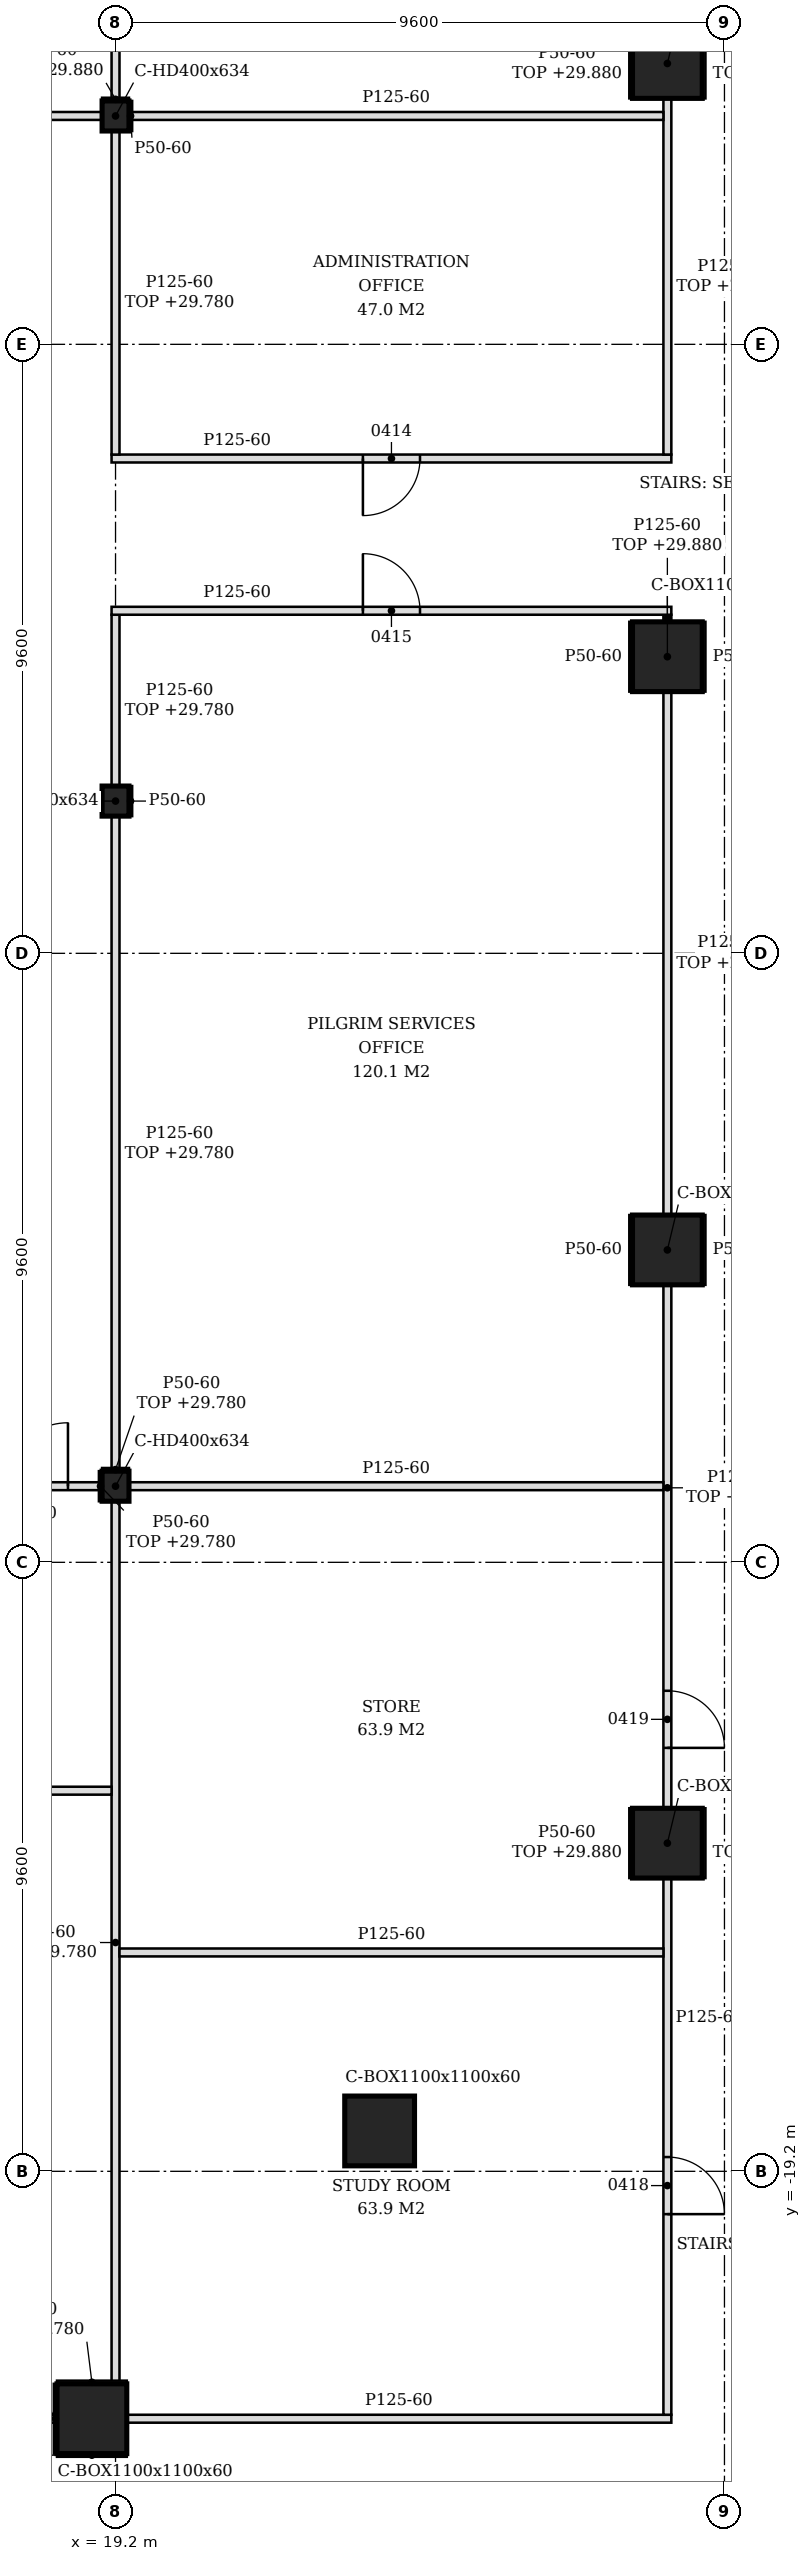
"""IFC4 building model, lengths in metres.
Left out: names, types, materials, properties, quantities, classifications, styles, units other than length and angle.
Written with IfcOpenShell. Run it as: python <this file> out.ifc"""

import sys

from ifc_helpers import new_model, si_unit, direction, frame, frame_2d, origin, origin_2d, place, context, subcontext, project, spatial, polyline, rectangle, hollow_rectangle, i_section, outline, extrude, element, fill, save


model = new_model("IFC4")
c1 = context("Model", 3, precision=1e-05, world=origin(), true_north=direction((0.0, 1.0)))
c2 = subcontext(c1, "Body", "Model", "MODEL_VIEW")
j1 = project(units=[si_unit("LENGTHUNIT", "METRE"), si_unit("PLANEANGLEUNIT", "RADIAN")], contexts=[c1])
p1 = place(None, origin())
s1 = spatial("IfcSite", under=j1, at=p1, CompositionType="ELEMENT")
p2 = place(p1, origin())
s2 = spatial("IfcBuilding", under=s1, at=p2, CompositionType="ELEMENT")
p3 = place(p2, frame((0.0, 0.0, 25.8)))
s3 = spatial("IfcBuildingStorey", under=s2, at=p3, CompositionType="ELEMENT", Elevation=25.8)
for number, where, z_axis, x_axis in (
    (1, (18.827, -23.1, -0.2), (0.0, 0.0, 1.0), (1.0, 0.0, 0.0)),
    (2, (23.364, -18.564, -0.2), (0.0, 0.0, 1.0), (1.0, 0.0, 0.0)),
    (3, (27.9, -14.027, -0.2), (0.0, 0.0, 1.0), (1.0, 0.0, 0.0)),
    (4, (27.9, -4.676, -0.2), (0.0, 0.0, 1.0), (1.0, 0.0, 0.0)),
    (5, (27.9, 4.676, -0.2), (0.0, 0.0, 1.0), (1.0, 0.0, 0.0)),
    (6, (27.9, 14.027, -0.2), (0.0, 0.0, 1.0), (1.0, 0.0, 0.0)),
):
    element("IfcColumn", number, at=place(p3, frame(where, z_axis=z_axis, x_axis=x_axis)), inside=s3, PredefinedType="COLUMN", context=c2, shape_type="SweptSolid", body=[
        extrude(hollow_rectangle(XDim=1.1, YDim=1.1, WallThickness=0.06, at=origin_2d()), origin(), (0.0, 0.0, 1.0), 4.8),
    ])
for number, where, z_axis, x_axis in (
    (7, (19.2, -8.4, -0.2), (0.0, 0.0, 1.0), (1.0, 0.0, 0.0)),
    (8, (19.2, 2.4, -0.2), (0.0, 0.0, 1.0), (1.0, 0.0, 0.0)),
    (9, (19.2, 13.2, -0.2), (0.0, 0.0, 1.0), (1.0, 0.0, 0.0)),
):
    element("IfcColumn", number, at=place(p3, frame(where, z_axis=z_axis, x_axis=x_axis)), inside=s3, PredefinedType="COLUMN", context=c2, shape_type="SweptSolid", body=[
        extrude(i_section(OverallWidth=0.424, OverallDepth=0.474, WebThickness=0.048, FlangeThickness=0.077, FilletRadius=0.015, at=origin_2d()), origin(), (0.0, 0.0, 1.0), 4.8),
    ])
p4 = place(p3, frame((9.964, -23.1, 0.0), z_axis=(0.0, 0.0, 1.0), x_axis=(1.0, 0.0, 0.0)))
e10 = element("IfcWall", 10, at=p4, inside=s3, PredefinedType="PARTITIONING", context=c2, shape_type="SweptSolid", body=[
    extrude(rectangle(XDim=8.313, YDim=0.125, at=frame_2d((4.157, 0.0))), origin(), (0.0, 0.0, 1.0), 4.08),
])
p5 = place(p4, frame((3.986, 0.0, 0.0)))
e11 = element("IfcOpeningElement", 11, at=p5, cuts=e10, PredefinedType="OPENING", context=c2, shape_type="SweptSolid", body=[
    extrude(rectangle(XDim=0.9, YDim=2.1, at=frame_2d((0.45, 1.05))), frame((0.0, 0.073, 0.0), z_axis=(0.0, -1.0, 0.0), x_axis=(1.0, 0.0, 0.0)), (0.0, 0.0, 1.0), 0.145),
])
p6 = place(p3, frame((19.377, -23.1, 0.0), z_axis=(0.0, 0.0, 1.0), x_axis=(1.0, 0.0, 0.0)))
e12 = element("IfcWall", 12, at=p6, inside=s3, PredefinedType="PARTITIONING", context=c2, shape_type="SweptSolid", body=[
    extrude(rectangle(XDim=8.585, YDim=0.125, at=frame_2d((4.292, 0.0))), origin(), (0.0, 0.0, 1.0), 4.6),
])
p7 = place(p3, frame((27.9, -23.038, 0.0), z_axis=(0.0, 0.0, 1.0), x_axis=(0.0, 1.0, 0.0)))
e13 = element("IfcWall", 13, at=p7, inside=s3, PredefinedType="PARTITIONING", context=c2, shape_type="SweptSolid", body=[
    extrude(outline(polyline([(0.0, 0.0), (8.46, 0.0), (8.46, 4.6), (3.927, 4.6), (3.926, 4.18), (3.748, 4.18), (3.746, 4.6), (0.0, 4.6), (0.0, 0.0)])), frame((0.0, 0.062, 0.0), z_axis=(0.0, -1.0, 0.0), x_axis=(1.0, 0.0, 0.0)), (0.0, 0.0, 1.0), 0.125),
])
p8 = place(p7, frame((3.163, 0.0, 0.0)))
e14 = element("IfcOpeningElement", 14, at=p8, cuts=e13, PredefinedType="OPENING", context=c2, shape_type="SweptSolid", body=[
    extrude(rectangle(XDim=0.9, YDim=2.1, at=frame_2d((0.45, 1.05))), frame((0.0, 0.073, 0.0), z_axis=(0.0, -1.0, 0.0), x_axis=(1.0, 0.0, 0.0)), (0.0, 0.0, 1.0), 0.145),
])
p9 = place(p3, frame((19.2, -22.55, 0.0), z_axis=(0.0, 0.0, 1.0), x_axis=(0.0, 1.0, 0.0)))
e15 = element("IfcWall", 15, at=p9, inside=s3, PredefinedType="PARTITIONING", context=c2, shape_type="SweptSolid", body=[
    extrude(rectangle(XDim=13.913, YDim=0.125, at=frame_2d((6.957, 0.0))), origin(), (0.0, 0.0, 1.0), 3.98),
])
p10 = place(p3, frame((19.262, -15.75, 0.0), z_axis=(0.0, 0.0, 1.0), x_axis=(1.0, 0.0, 0.0)))
e16 = element("IfcWall", 16, at=p10, inside=s3, PredefinedType="PARTITIONING", context=c2, shape_type="SweptSolid", body=[
    extrude(outline(polyline([(0.0, 0.0), (8.575, 0.0), (8.575, 4.6), (7.189, 4.6), (7.187, 4.08), (6.64, 4.08), (6.638, 4.6), (0.087, 4.6), (0.085, 3.98), (0.0, 3.98), (0.0, 0.0)])), frame((0.0, 0.062, 0.0), z_axis=(0.0, -1.0, 0.0), x_axis=(1.0, 0.0, 0.0)), (0.0, 0.0, 1.0), 0.125),
])
p11 = place(p3, frame((27.9, -13.477, 0.0), z_axis=(0.0, 0.0, 1.0), x_axis=(0.0, 1.0, 0.0)))
e17 = element("IfcWall", 17, at=p11, inside=s3, PredefinedType="PARTITIONING", context=c2, shape_type="SweptSolid", body=[
    extrude(rectangle(XDim=8.252, YDim=0.125, at=frame_2d((4.126, 0.0))), origin(), (0.0, 0.0, 1.0), 4.08),
])
p12 = place(p11, frame((0.952, 0.0, 0.0)))
e18 = element("IfcOpeningElement", 18, at=p12, cuts=e17, PredefinedType="OPENING", context=c2, shape_type="SweptSolid", body=[
    extrude(rectangle(XDim=0.9, YDim=2.1, at=frame_2d((0.45, 1.05))), frame((0.0, 0.073, 0.0), z_axis=(0.0, -1.0, 0.0), x_axis=(1.0, 0.0, 0.0)), (0.0, 0.0, 1.0), 0.145),
])
p13 = place(p3, frame((-4.738, -13.2, 0.0), z_axis=(0.0, 0.0, 1.0), x_axis=(1.0, 0.0, 0.0)))
e19 = element("IfcWall", 19, at=p13, inside=s3, PredefinedType="PARTITIONING", context=c2, shape_type="SweptSolid", body=[
    extrude(outline(polyline([(0.0, 0.0), (23.875, 0.0), (23.875, 3.98), (23.788, 3.98), (23.785, 4.6), (19.288, 4.6), (19.285, 3.98), (18.988, 3.98), (18.986, 4.6), (14.488, 4.6), (14.486, 3.98), (14.188, 3.98), (14.186, 4.6), (9.688, 4.6), (9.686, 3.98), (9.387, 3.98), (9.385, 4.6), (4.887, 4.6), (4.885, 3.98), (4.587, 3.98), (4.585, 4.6), (0.087, 4.6), (0.085, 3.98), (0.0, 3.98), (0.0, 0.0)])), frame((0.0, 0.062, 0.0), z_axis=(0.0, -1.0, 0.0), x_axis=(1.0, 0.0, 0.0)), (0.0, 0.0, 1.0), 0.125),
])
p14 = place(p3, frame((7.412, -8.4, 0.0), z_axis=(0.0, 0.0, 1.0), x_axis=(1.0, 0.0, 0.0)))
e20 = element("IfcWall", 20, at=p14, inside=s3, PredefinedType="PARTITIONING", context=c2, shape_type="SweptSolid", body=[
    extrude(rectangle(XDim=11.576, YDim=0.125, at=frame_2d((5.788, 0.0))), origin(), (0.0, 0.0, 1.0), 3.98),
])
p15 = place(p14, frame((4.138, 0.0, 0.0)))
e21 = element("IfcOpeningElement", 21, at=p15, cuts=e20, PredefinedType="OPENING", context=c2, shape_type="SweptSolid", body=[
    extrude(rectangle(XDim=0.8, YDim=2.1, at=frame_2d((0.4, 1.05))), frame((0.0, 0.073, 0.0), z_axis=(0.0, -1.0, 0.0), x_axis=(1.0, 0.0, 0.0)), (0.0, 0.0, 1.0), 0.145),
])
p16 = place(p14, frame((10.038, 0.0, 0.0)))
e22 = element("IfcOpeningElement", 22, at=p16, cuts=e20, PredefinedType="OPENING", context=c2, shape_type="SweptSolid", body=[
    extrude(rectangle(XDim=1.0, YDim=2.1, at=frame_2d((0.5, 1.05))), frame((0.0, 0.073, 0.0), z_axis=(0.0, -1.0, 0.0), x_axis=(1.0, 0.0, 0.0)), (0.0, 0.0, 1.0), 0.145),
])
p17 = place(p3, frame((19.412, -8.4, 0.0), z_axis=(0.0, 0.0, 1.0), x_axis=(1.0, 0.0, 0.0)))
e23 = element("IfcWall", 23, at=p17, inside=s3, PredefinedType="PARTITIONING", context=c2, shape_type="SweptSolid", body=[
    extrude(outline(polyline([(0.0, 0.0), (8.425, 0.0), (8.426, 4.08), (8.338, 4.08), (8.336, 4.6), (0.0, 4.6), (0.0, 0.0)])), frame((0.0, 0.062, 0.0), z_axis=(0.0, -1.0, 0.0), x_axis=(1.0, 0.0, 0.0)), (0.0, 0.0, 1.0), 0.125),
])
p18 = place(p3, frame((19.2, -8.163, 0.0), z_axis=(0.0, 0.0, 1.0), x_axis=(0.0, 1.0, 0.0)))
e24 = element("IfcWall", 24, at=p18, inside=s3, PredefinedType="PARTITIONING", context=c2, shape_type="SweptSolid", body=[
    extrude(rectangle(XDim=10.326, YDim=0.125, at=frame_2d((5.163, 0.0))), origin(), (0.0, 0.0, 1.0), 3.98),
])
p19 = place(p3, frame((27.9, -4.126, 0.0), z_axis=(0.0, 0.0, 1.0), x_axis=(0.0, 1.0, 0.0)))
e25 = element("IfcWall", 25, at=p19, inside=s3, PredefinedType="PARTITIONING", context=c2, shape_type="SweptSolid", body=[
    extrude(rectangle(XDim=8.251, YDim=0.125, at=frame_2d((4.126, 0.0))), origin(), (0.0, 0.0, 1.0), 4.08),
])
p20 = place(p3, frame((19.2, 2.637, 0.0), z_axis=(0.0, 0.0, 1.0), x_axis=(0.0, 1.0, 0.0)))
e26 = element("IfcWall", 26, at=p20, inside=s3, PredefinedType="PARTITIONING", context=c2, shape_type="SweptSolid", body=[
    extrude(rectangle(XDim=2.7, YDim=0.125, at=frame_2d((1.35, 0.0))), origin(), (0.0, 0.0, 1.0), 3.98),
])
p21 = place(p3, frame((27.9, 5.226, 0.0), z_axis=(0.0, 0.0, 1.0), x_axis=(0.0, 1.0, 0.0)))
e27 = element("IfcWall", 27, at=p21, inside=s3, PredefinedType="PARTITIONING", context=c2, shape_type="SweptSolid", body=[
    extrude(rectangle(XDim=0.112, YDim=0.125, at=frame_2d((0.056, 0.0))), origin(), (0.0, 0.0, 1.0), 4.08),
])
p22 = place(p3, frame((19.137, 5.4, 0.0), z_axis=(0.0, 0.0, 1.0), x_axis=(1.0, 0.0, 0.0)))
e28 = element("IfcWall", 28, at=p22, inside=s3, PredefinedType="PARTITIONING", context=c2, shape_type="SweptSolid", body=[
    extrude(outline(polyline([(0.0, 0.0), (8.825, 0.0), (8.825, 4.08), (8.613, 4.08), (8.611, 4.6), (4.962, 4.6), (4.96, 4.08), (4.762, 4.08), (4.76, 4.6), (0.212, 4.6), (0.21, 3.98), (0.0, 3.98), (0.0, 0.0)])), frame((0.0, 0.062, 0.0), z_axis=(0.0, -1.0, 0.0), x_axis=(1.0, 0.0, 0.0)), (0.0, 0.0, 1.0), 0.125),
])
p23 = place(p22, frame((3.962, 0.0, 0.0)))
e29 = element("IfcOpeningElement", 29, at=p23, cuts=e28, PredefinedType="OPENING", context=c2, shape_type="SweptSolid", body=[
    extrude(rectangle(XDim=0.9, YDim=2.1, at=frame_2d((0.45, 1.05))), frame((0.0, 0.073, 0.0), z_axis=(0.0, -1.0, 0.0), x_axis=(1.0, 0.0, 0.0)), (0.0, 0.0, 1.0), 0.145),
])
p24 = place(p3, frame((19.137, 7.8, 0.0), z_axis=(0.0, 0.0, 1.0), x_axis=(1.0, 0.0, 0.0)))
e30 = element("IfcWall", 30, at=p24, inside=s3, PredefinedType="PARTITIONING", context=c2, shape_type="SweptSolid", body=[
    extrude(outline(polyline([(0.0, 0.0), (8.825, 0.0), (8.825, 4.08), (8.613, 4.08), (8.611, 4.6), (4.962, 4.6), (4.96, 4.08), (4.762, 4.08), (4.76, 4.6), (0.212, 4.6), (0.21, 3.98), (0.0, 3.98), (0.0, 0.0)])), frame((0.0, 0.062, 0.0), z_axis=(0.0, -1.0, 0.0), x_axis=(1.0, 0.0, 0.0)), (0.0, 0.0, 1.0), 0.125),
])
p25 = place(p24, frame((3.962, 0.0, 0.0)))
e31 = element("IfcOpeningElement", 31, at=p25, cuts=e30, PredefinedType="OPENING", context=c2, shape_type="SweptSolid", body=[
    extrude(rectangle(XDim=0.9, YDim=2.1, at=frame_2d((0.45, 1.05))), frame((0.0, 0.073, 0.0), z_axis=(0.0, -1.0, 0.0), x_axis=(1.0, 0.0, 0.0)), (0.0, 0.0, 1.0), 0.145),
])
p26 = place(p3, frame((19.2, 7.863, 0.0), z_axis=(0.0, 0.0, 1.0), x_axis=(0.0, 1.0, 0.0)))
e32 = element("IfcWall", 32, at=p26, inside=s3, PredefinedType="PARTITIONING", context=c2, shape_type="SweptSolid", body=[
    extrude(rectangle(XDim=5.1, YDim=0.125, at=frame_2d((2.55, 0.0))), origin(), (0.0, 0.0, 1.0), 3.98),
])
p27 = place(p3, frame((27.9, 7.863, 0.0), z_axis=(0.0, 0.0, 1.0), x_axis=(0.0, 1.0, 0.0)))
e33 = element("IfcWall", 33, at=p27, inside=s3, PredefinedType="PARTITIONING", context=c2, shape_type="SweptSolid", body=[
    extrude(rectangle(XDim=5.615, YDim=0.125, at=frame_2d((2.807, 0.0))), origin(), (0.0, 0.0, 1.0), 4.08),
])
p28 = place(p3, frame((7.412, 13.2, 0.0), z_axis=(0.0, 0.0, 1.0), x_axis=(1.0, 0.0, 0.0)))
e34 = element("IfcWall", 34, at=p28, inside=s3, PredefinedType="PARTITIONING", context=c2, shape_type="SweptSolid", body=[
    extrude(rectangle(XDim=11.576, YDim=0.125, at=frame_2d((5.788, 0.0))), origin(), (0.0, 0.0, 1.0), 3.98),
])
p29 = place(p28, frame((5.338, 0.0, 0.0)))
e35 = element("IfcOpeningElement", 35, at=p29, cuts=e34, PredefinedType="OPENING", context=c2, shape_type="SweptSolid", body=[
    extrude(rectangle(XDim=0.9, YDim=2.1, at=frame_2d((0.45, 1.05))), frame((0.0, 0.073, 0.0), z_axis=(0.0, -1.0, 0.0), x_axis=(1.0, 0.0, 0.0)), (0.0, 0.0, 1.0), 0.145),
])
p30 = place(p3, frame((19.412, 13.2, 0.0), z_axis=(0.0, 0.0, 1.0), x_axis=(1.0, 0.0, 0.0)))
e36 = element("IfcWall", 36, at=p30, inside=s3, PredefinedType="PARTITIONING", context=c2, shape_type="SweptSolid", body=[
    extrude(outline(polyline([(0.0, 0.0), (8.425, 0.0), (8.426, 4.08), (8.338, 4.08), (8.336, 4.6), (4.678, 4.6), (4.676, 4.18), (4.498, 4.18), (4.496, 4.6), (0.0, 4.6), (0.0, 0.0)])), frame((0.0, 0.062, 0.0), z_axis=(0.0, -1.0, 0.0), x_axis=(1.0, 0.0, 0.0)), (0.0, 0.0, 1.0), 0.125),
])
p31 = place(p3, frame((19.2, 13.437, 0.0), z_axis=(0.0, 0.0, 1.0), x_axis=(0.0, 1.0, 0.0)))
e37 = element("IfcWall", 37, at=p31, inside=s3, PredefinedType="PARTITIONING", context=c2, shape_type="SweptSolid", body=[
    extrude(rectangle(XDim=9.113, YDim=0.125, at=frame_2d((4.557, 0.0))), origin(), (0.0, 0.0, 1.0), 4.08),
])
p32 = place(p3, frame((18.277, -22.525, 0.0), z_axis=(0.0, 0.0, 1.0), x_axis=(1.0, 0.0, 0.0)))
e38 = element("IfcWall", 38, at=p32, inside=s3, PredefinedType="PARTITIONING", context=c2, shape_type="SweptSolid", body=[
    extrude(rectangle(XDim=1.1, YDim=0.05, at=frame_2d((0.55, 0.0))), origin(), (0.0, 0.0, 1.0), 3.98),
])
p33 = place(p3, frame((18.277, -23.675, 0.0), z_axis=(0.0, 0.0, 1.0), x_axis=(1.0, 0.0, 0.0)))
e39 = element("IfcWall", 39, at=p33, inside=s3, PredefinedType="PARTITIONING", context=c2, shape_type="SweptSolid", body=[
    extrude(rectangle(XDim=1.1, YDim=0.05, at=frame_2d((0.55, 0.0))), origin(), (0.0, 0.0, 1.0), 4.22),
])
p34 = place(p3, frame((18.252, -23.65, 0.0), z_axis=(0.0, 0.0, 1.0), x_axis=(0.0, 1.0, 0.0)))
e40 = element("IfcWall", 40, at=p34, inside=s3, PredefinedType="PARTITIONING", context=c2, shape_type="SweptSolid", body=[
    extrude(rectangle(XDim=1.1, YDim=0.05, at=frame_2d((0.55, 0.0))), origin(), (0.0, 0.0, 1.0), 4.08),
])
p35 = place(p3, frame((18.963, -8.637, 0.0), z_axis=(0.0, 0.0, 1.0), x_axis=(0.0, 1.0, 0.0)))
e41 = element("IfcWall", 41, at=p35, inside=s3, PredefinedType="PARTITIONING", context=c2, shape_type="SweptSolid", body=[
    extrude(rectangle(XDim=0.474, YDim=0.05, at=frame_2d((0.237, 0.0))), origin(), (0.0, 0.0, 1.0), 3.98),
])
for number, where, z_axis, x_axis in (
    (42, (27.325, -14.577, 0.0), (0.0, 0.0, 1.0), (0.0, 1.0, 0.0)),
    (43, (28.475, -14.577, 0.0), (0.0, 0.0, 1.0), (0.0, 1.0, 0.0)),
):
    element("IfcWall", number, at=place(p3, frame(where, z_axis=z_axis, x_axis=x_axis)), inside=s3, PredefinedType="PARTITIONING", context=c2, shape_type="SweptSolid", body=[
        extrude(rectangle(XDim=1.1, YDim=0.05, at=frame_2d((0.55, 0.0))), origin(), (0.0, 0.0, 1.0), 4.08),
    ])
for number, where, z_axis, x_axis in (
    (44, (27.325, -5.226, 0.0), (0.0, 0.0, 1.0), (0.0, 1.0, 0.0)),
    (45, (28.475, -5.226, 0.0), (0.0, 0.0, 1.0), (0.0, 1.0, 0.0)),
    (46, (27.325, 4.126, 0.0), (0.0, 0.0, 1.0), (0.0, 1.0, 0.0)),
    (47, (28.475, 4.126, 0.0), (0.0, 0.0, 1.0), (0.0, 1.0, 0.0)),
):
    element("IfcWall", number, at=place(p3, frame(where, z_axis=z_axis, x_axis=x_axis)), inside=s3, PredefinedType="PARTITIONING", context=c2, shape_type="SweptSolid", body=[
        extrude(rectangle(XDim=1.1, YDim=0.05, at=frame_2d((0.55, 0.0))), origin(), (0.0, 0.0, 1.0), 4.6),
    ])
p36 = place(p3, frame((18.988, -8.138, 0.0), z_axis=(0.0, 0.0, 1.0), x_axis=(1.0, 0.0, 0.0)))
e48 = element("IfcWall", 48, at=p36, inside=s3, PredefinedType="PARTITIONING", context=c2, shape_type="SweptSolid", body=[
    extrude(rectangle(XDim=0.424, YDim=0.05, at=frame_2d((0.212, 0.0))), origin(), (0.0, 0.0, 1.0), 3.98),
])
p37 = place(p3, frame((19.437, 2.163, 0.0), z_axis=(0.0, 0.0, 1.0), x_axis=(0.0, 1.0, 0.0)))
e49 = element("IfcWall", 49, at=p37, inside=s3, PredefinedType="PARTITIONING", context=c2, shape_type="SweptSolid", body=[
    extrude(rectangle(XDim=0.474, YDim=0.05, at=frame_2d((0.237, 0.0))), origin(), (0.0, 0.0, 1.0), 4.6),
])
p38 = place(p3, frame((19.437, 12.963, 0.0), z_axis=(0.0, 0.0, 1.0), x_axis=(0.0, 1.0, 0.0)))
e50 = element("IfcWall", 50, at=p38, inside=s3, PredefinedType="PARTITIONING", context=c2, shape_type="SweptSolid", body=[
    extrude(rectangle(XDim=0.474, YDim=0.05, at=frame_2d((0.237, 0.0))), origin(), (0.0, 0.0, 1.0), 4.6),
])
for number, where, z_axis, x_axis in (
    (51, (27.325, 13.477, 0.0), (0.0, 0.0, 1.0), (0.0, 1.0, 0.0)),
    (52, (28.475, 13.477, 0.0), (0.0, 0.0, 1.0), (0.0, 1.0, 0.0)),
):
    element("IfcWall", number, at=place(p3, frame(where, z_axis=z_axis, x_axis=x_axis)), inside=s3, PredefinedType="PARTITIONING", context=c2, shape_type="SweptSolid", body=[
        extrude(rectangle(XDim=1.1, YDim=0.05, at=frame_2d((0.55, 0.0))), origin(), (0.0, 0.0, 1.0), 4.08),
    ])
p39 = place(p3, frame((18.988, 13.462, 0.0), z_axis=(0.0, 0.0, 1.0), x_axis=(1.0, 0.0, 0.0)))
e53 = element("IfcWall", 53, at=p39, inside=s3, PredefinedType="PARTITIONING", context=c2, shape_type="SweptSolid", body=[
    extrude(rectangle(XDim=0.424, YDim=0.05, at=frame_2d((0.212, 0.0))), origin(), (0.0, 0.0, 1.0), 4.08),
])
p40 = place(p16, origin())
e54 = element("IfcDoor", 54, at=p40, inside=s3, OperationType="SINGLE_SWING_RIGHT", PredefinedType="DOOR", context=c2, shape_type="SweptSolid", body=[
    extrude(rectangle(XDim=1.0, YDim=2.1, at=frame_2d((0.5, 1.05))), frame((0.0, 0.025, 0.0), z_axis=(0.0, -1.0, 0.0), x_axis=(1.0, 0.0, 0.0)), (0.0, 0.0, 1.0), 0.05),
])
fill(e22, e54)
p41 = place(p25, frame((0.9, 0.0, 0.0), z_axis=(0.0, 0.0, 1.0), x_axis=(-1.0, 0.0, 0.0)))
e55 = element("IfcDoor", 55, at=p41, inside=s3, OperationType="SINGLE_SWING_RIGHT", PredefinedType="DOOR", context=c2, shape_type="SweptSolid", body=[
    extrude(rectangle(XDim=0.9, YDim=2.1, at=frame_2d((0.45, 1.05))), frame((0.0, 0.025, 0.0), z_axis=(0.0, -1.0, 0.0), x_axis=(1.0, 0.0, 0.0)), (0.0, 0.0, 1.0), 0.05),
])
fill(e31, e55)
p42 = place(p23, origin())
e56 = element("IfcDoor", 56, at=p42, inside=s3, OperationType="SINGLE_SWING_LEFT", PredefinedType="DOOR", context=c2, shape_type="SweptSolid", body=[
    extrude(rectangle(XDim=0.9, YDim=2.1, at=frame_2d((0.45, 1.05))), frame((0.0, 0.025, 0.0), z_axis=(0.0, -1.0, 0.0), x_axis=(1.0, 0.0, 0.0)), (0.0, 0.0, 1.0), 0.05),
])
fill(e29, e56)
p43 = place(p8, frame((0.9, 0.0, 0.0), z_axis=(0.0, 0.0, 1.0), x_axis=(-1.0, 0.0, 0.0)))
e57 = element("IfcDoor", 57, at=p43, inside=s3, OperationType="SINGLE_SWING_RIGHT", PredefinedType="DOOR", context=c2, shape_type="SweptSolid", body=[
    extrude(rectangle(XDim=0.9, YDim=2.1, at=frame_2d((0.45, 1.05))), frame((0.0, 0.025, 0.0), z_axis=(0.0, -1.0, 0.0), x_axis=(1.0, 0.0, 0.0)), (0.0, 0.0, 1.0), 0.05),
])
fill(e14, e57)
p44 = place(p12, frame((0.9, 0.0, 0.0), z_axis=(0.0, 0.0, 1.0), x_axis=(-1.0, 0.0, 0.0)))
e58 = element("IfcDoor", 58, at=p44, inside=s3, OperationType="SINGLE_SWING_RIGHT", PredefinedType="DOOR", context=c2, shape_type="SweptSolid", body=[
    extrude(rectangle(XDim=0.9, YDim=2.1, at=frame_2d((0.45, 1.05))), frame((0.0, 0.025, 0.0), z_axis=(0.0, -1.0, 0.0), x_axis=(1.0, 0.0, 0.0)), (0.0, 0.0, 1.0), 0.05),
])
fill(e18, e58)
save(model, sys.argv[1])
